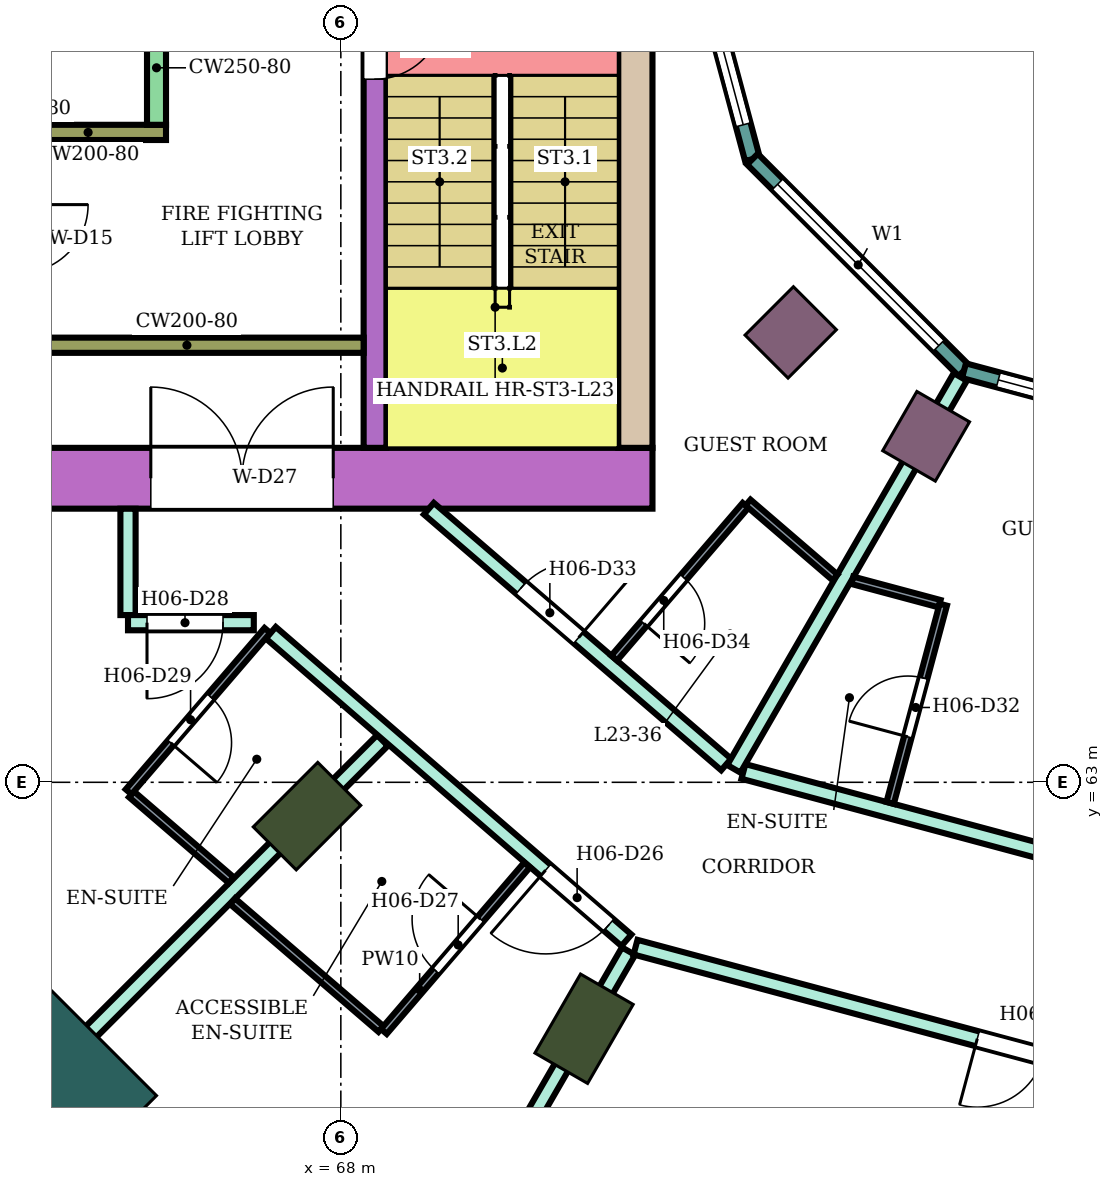
"""IFC4 building model, lengths in metres.
Left out: names, types, materials, properties, quantities, classifications, styles, units other than length and angle.
Written with IfcOpenShell. Run it as: python <this file> out.ifc"""

import sys

from ifc_helpers import new_model, si_unit, direction, frame, frame_2d, origin, origin_2d, place, context, subcontext, project, spatial, rectangle, extrude, element, fill, save


model = new_model("IFC4")
c1 = context("Model", 3, precision=1e-05, world=origin(), true_north=direction((0.0, 1.0)))
c2 = subcontext(c1, "Body", "Model", "MODEL_VIEW")
j1 = project(units=[si_unit("LENGTHUNIT", "METRE"), si_unit("PLANEANGLEUNIT", "RADIAN")], contexts=[c1])
p1 = place(None, origin())
s1 = spatial("IfcSite", under=j1, at=p1, CompositionType="ELEMENT")
p2 = place(p1, origin())
s2 = spatial("IfcBuilding", under=s1, at=p2, CompositionType="ELEMENT")
p3 = place(p2, frame((0.0, 0.0, 101.4)))
s3 = spatial("IfcBuildingStorey", under=s2, at=p3, CompositionType="ELEMENT", Elevation=101.4)
for number, where, z_axis, x_axis in (
    (1, (67.555, 62.555, 0.0), (0.0, 0.0, 1.0), (-0.707, -0.707, 0.0)),
    (2, (71.2, 59.758, 0.0), (0.0, 0.0, 1.0), (-0.5, -0.866, 0.0)),
):
    element("IfcColumn", number, at=place(p3, frame(where, z_axis=z_axis, x_axis=x_axis)), inside=s3, PredefinedType="COLUMN", context=c2, shape_type="SweptSolid", body=[
        extrude(rectangle(XDim=1.2, YDim=0.8, at=origin_2d()), origin(), (0.0, 0.0, 1.0), 3.8),
    ])
for number, where, z_axis, x_axis in (
    (3, (73.919, 68.919, 0.0), (0.0, 0.0, 1.0), (-0.707, -0.707, 0.0)),
    (4, (75.7, 67.552, 0.0), (0.0, 0.0, 1.0), (-0.5, -0.866, 0.0)),
):
    element("IfcColumn", number, at=place(p3, frame(where, z_axis=z_axis, x_axis=x_axis)), inside=s3, PredefinedType="COLUMN", context=c2, shape_type="SweptSolid", body=[
        extrude(rectangle(XDim=0.9, YDim=0.8, at=origin_2d()), origin(), (0.0, 0.0, 1.0), 3.8),
    ])
p4 = place(p3, frame((64.09, 59.09, 0.0), z_axis=(0.0, 0.0, 1.0), x_axis=(-0.707106781187, -0.707106781187, 0.0)))
e5 = element("IfcColumn", 5, at=p4, inside=s3, PredefinedType="COLUMN", context=c2, shape_type="SweptSolid", body=[
    extrude(rectangle(XDim=1.8, YDim=2.4, at=origin_2d()), origin(), (0.0, 0.0, 1.0), 3.8),
])
p5 = place(p3, frame((72.1, 67.0, 0.0), z_axis=(0.0, 0.0, 1.0), x_axis=(-1.0, 0.0, 0.0)))
e6 = element("IfcWall", 6, at=p5, inside=s3, PredefinedType="SHEAR", context=c2, shape_type="SweptSolid", body=[
    extrude(rectangle(XDim=14.7, YDim=0.8, at=frame_2d((7.35, 0.0))), origin(), (0.0, 0.0, 1.0), 3.48),
])
p6 = place(p5, frame((4.2, 0.0, 0.0)))
e7 = element("IfcOpeningElement", 7, at=p6, cuts=e6, PredefinedType="OPENING", context=c2, shape_type="SweptSolid", body=[
    extrude(rectangle(XDim=2.4, YDim=2.4, at=frame_2d((1.2, 1.2))), frame((0.0, 0.41, 0.0), z_axis=(0.0, -1.0, 0.0), x_axis=(1.0, 0.0, 0.0)), (0.0, 0.0, 1.0), 0.82),
])
p7 = place(p3, frame((71.875, 75.0, 0.0), z_axis=(0.0, 0.0, 1.0), x_axis=(0.0, -1.0, 0.0)))
e8 = element("IfcWall", 8, at=p7, inside=s3, PredefinedType="SHEAR", context=c2, shape_type="SweptSolid", body=[
    extrude(rectangle(XDim=7.6, YDim=0.45, at=frame_2d((3.8, 0.0))), origin(), (0.0, 0.0, 1.0), 3.48),
])
p8 = place(p3, frame((68.45, 75.0, 0.0), z_axis=(0.0, 0.0, 1.0), x_axis=(0.0, -1.0, 0.0)))
e9 = element("IfcWall", 9, at=p8, inside=s3, PredefinedType="SHEAR", context=c2, shape_type="SweptSolid", body=[
    extrude(rectangle(XDim=7.6, YDim=0.3, at=frame_2d((3.8, 0.0))), origin(), (0.0, 0.0, 1.0), 3.48),
])
p9 = place(p8, frame((1.85, 0.0, 0.0)))
e10 = element("IfcOpeningElement", 10, at=p9, cuts=e9, PredefinedType="OPENING", context=c2, shape_type="SweptSolid", body=[
    extrude(rectangle(XDim=0.9, YDim=2.1, at=frame_2d((0.45, 1.05))), frame((0.0, 0.16, 0.0), z_axis=(0.0, -1.0, 0.0), x_axis=(1.0, 0.0, 0.0)), (0.0, 0.0, 1.0), 0.32),
])
p10 = place(p3, frame((68.3, 68.75, 0.0), z_axis=(0.0, 0.0, 1.0), x_axis=(-1.0, 0.0, 0.0)))
e11 = element("IfcWall", 11, at=p10, inside=s3, PredefinedType="SHEAR", context=c2, shape_type="SweptSolid", body=[
    extrude(rectangle(XDim=4.65, YDim=0.2, at=frame_2d((2.325, 0.0))), origin(), (0.0, 0.0, 1.0), 3.48),
])
p11 = place(p3, frame((65.7, 71.55, 0.0), z_axis=(0.0, 0.0, 1.0), x_axis=(-1.0, 0.0, 0.0)))
e12 = element("IfcWall", 12, at=p11, inside=s3, PredefinedType="SHEAR", context=c2, shape_type="SweptSolid", body=[
    extrude(rectangle(XDim=2.05, YDim=0.2, at=frame_2d((1.025, 0.0))), origin(), (0.0, 0.0, 1.0), 3.48),
])
p12 = place(p3, frame((65.575, 73.15, 0.0), z_axis=(0.0, 0.0, 1.0), x_axis=(0.0, -1.0, 0.0)))
e13 = element("IfcWall", 13, at=p12, inside=s3, PredefinedType="SHEAR", context=c2, shape_type="SweptSolid", body=[
    extrude(rectangle(XDim=1.5, YDim=0.25, at=frame_2d((0.75, 0.0))), origin(), (0.0, 0.0, 1.0), 3.48),
])
p13 = place(p3, frame((72.396, 75.0, 0.0), z_axis=(0.0, 0.0, 1.0), x_axis=(0.258789828301, -0.965933654434, 0.0)))
e14 = element("IfcWall", 14, at=p13, inside=s3, PredefinedType="NOTDEFINED", context=c2, shape_type="SweptSolid", body=[
    extrude(rectangle(XDim=3.936, YDim=0.2, at=frame_2d((1.968, 0.0))), origin(), (0.0, 0.0, 1.0), 3.8),
])
p14 = place(p13, frame((0.468, 0.0, 0.9)))
e15 = element("IfcOpeningElement", 15, at=p14, cuts=e14, PredefinedType="OPENING", context=c2, shape_type="SweptSolid", body=[
    extrude(rectangle(XDim=3.0, YDim=2.3, at=frame_2d((1.5, 1.15))), frame((0.0, 0.11, 0.0), z_axis=(0.0, -1.0, 0.0), x_axis=(1.0, 0.0, 0.0)), (0.0, 0.0, 1.0), 0.22),
])
p15 = place(p3, frame((73.415, 71.198, 0.0), z_axis=(0.0, 0.0, 1.0), x_axis=(0.707106781187, -0.707106781187, 0.0)))
e16 = element("IfcWall", 16, at=p15, inside=s3, PredefinedType="NOTDEFINED", context=c2, shape_type="SweptSolid", body=[
    extrude(rectangle(XDim=3.936, YDim=0.2, at=frame_2d((1.968, 0.0))), origin(), (0.0, 0.0, 1.0), 3.8),
])
p16 = place(p15, frame((0.468, 0.0, 0.9)))
e17 = element("IfcOpeningElement", 17, at=p16, cuts=e16, PredefinedType="OPENING", context=c2, shape_type="SweptSolid", body=[
    extrude(rectangle(XDim=3.0, YDim=2.3, at=frame_2d((1.5, 1.15))), frame((0.0, 0.11, 0.0), z_axis=(0.0, -1.0, 0.0), x_axis=(1.0, 0.0, 0.0)), (0.0, 0.0, 1.0), 0.22),
])
p17 = place(p3, frame((76.198, 68.415, 0.0), z_axis=(0.0, 0.0, 1.0), x_axis=(0.965933654434, -0.258789828301, 0.0)))
e18 = element("IfcWall", 18, at=p17, inside=s3, PredefinedType="NOTDEFINED", context=c2, shape_type="SweptSolid", body=[
    extrude(rectangle(XDim=3.936, YDim=0.2, at=frame_2d((1.968, 0.0))), origin(), (0.0, 0.0, 1.0), 3.8),
])
p18 = place(p17, frame((0.468, 0.0, 0.9)))
e19 = element("IfcOpeningElement", 19, at=p18, cuts=e18, PredefinedType="OPENING", context=c2, shape_type="SweptSolid", body=[
    extrude(rectangle(XDim=3.0, YDim=2.3, at=frame_2d((1.5, 1.15))), frame((0.0, 0.11, 0.0), z_axis=(0.0, -1.0, 0.0), x_axis=(1.0, 0.0, 0.0)), (0.0, 0.0, 1.0), 0.22),
])
p19 = place(p3, frame((63.594, 58.598, 0.0), z_axis=(0.0, 0.0, 1.0), x_axis=(0.707228748718, 0.706984792613, 0.0)))
e20 = element("IfcWall", 20, at=p19, inside=s3, PredefinedType="PARTITIONING", context=c2, shape_type="SweptSolid", body=[
    extrude(rectangle(XDim=7.005, YDim=0.2, at=frame_2d((3.503, 0.0))), origin(), (0.0, 0.0, 1.0), 3.35),
])
p20 = place(p3, frame((65.2, 65.2, 0.0), z_axis=(0.0, 0.0, 1.0), x_axis=(0.0, 1.0, 0.0)))
e21 = element("IfcWall", 21, at=p20, inside=s3, PredefinedType="PARTITIONING", context=c2, shape_type="SweptSolid", body=[
    extrude(rectangle(XDim=1.399, YDim=0.2, at=frame_2d((0.7, 0.0))), origin(), (0.0, 0.0, 1.0), 3.35),
])
p21 = place(p3, frame((65.2, 65.1, 0.0), z_axis=(0.0, 0.0, 1.0), x_axis=(1.0, 0.0, 0.0)))
e22 = element("IfcWall", 22, at=p21, inside=s3, PredefinedType="PARTITIONING", context=c2, shape_type="SweptSolid", body=[
    extrude(rectangle(XDim=1.655, YDim=0.2, at=frame_2d((0.828, 0.0))), origin(), (0.0, 0.0, 1.0), 3.35),
])
p22 = place(p21, frame((0.25, 0.0, 0.0)))
e23 = element("IfcOpeningElement", 23, at=p22, cuts=e22, PredefinedType="OPENING", context=c2, shape_type="SweptSolid", body=[
    extrude(rectangle(XDim=1.0, YDim=2.1, at=frame_2d((0.5, 1.05))), frame((0.0, 0.11, 0.0), z_axis=(0.0, -1.0, 0.0), x_axis=(1.0, 0.0, 0.0)), (0.0, 0.0, 1.0), 0.22),
])
p23 = place(p3, frame((67.079, 64.968, 0.0), z_axis=(0.0, 0.0, 1.0), x_axis=(0.756371089567, -0.654142778656, 0.0)))
e24 = element("IfcWall", 24, at=p23, inside=s3, PredefinedType="PARTITIONING", context=c2, shape_type="SweptSolid", body=[
    extrude(rectangle(XDim=6.185, YDim=0.2, at=frame_2d((3.093, 0.0))), origin(), (0.0, 0.0, 1.0), 3.35),
])
p24 = place(p23, frame((4.778, 0.0, 0.0)))
e25 = element("IfcOpeningElement", 25, at=p24, cuts=e24, PredefinedType="OPENING", context=c2, shape_type="SweptSolid", body=[
    extrude(rectangle(XDim=1.1, YDim=2.1, at=frame_2d((0.55, 1.05))), frame((0.0, 0.11, 0.0), z_axis=(0.0, -1.0, 0.0), x_axis=(1.0, 0.0, 0.0)), (0.0, 0.0, 1.0), 0.22),
])
p25 = place(p3, frame((67.096, 52.662, 0.0), z_axis=(0.0, 0.0, 1.0), x_axis=(0.500222922337, 0.865896661253, 0.0)))
e26 = element("IfcWall", 26, at=p25, inside=s3, PredefinedType="PARTITIONING", context=c2, shape_type="SweptSolid", body=[
    extrude(rectangle(XDim=9.374, YDim=0.2, at=frame_2d((4.687, 0.0))), origin(), (0.0, 0.0, 1.0), 3.35),
])
p26 = place(p3, frame((69.158, 66.6, 0.0), z_axis=(0.0, 0.0, 1.0), x_axis=(0.757976058094, -0.652282373943, 0.0)))
e27 = element("IfcWall", 27, at=p26, inside=s3, PredefinedType="PARTITIONING", context=c2, shape_type="SweptSolid", body=[
    extrude(rectangle(XDim=5.16, YDim=0.2, at=frame_2d((2.58, 0.0))), origin(), (0.0, 0.0, 1.0), 3.35),
])
p27 = place(p26, frame((1.6, 0.0, 0.0)))
e28 = element("IfcOpeningElement", 28, at=p27, cuts=e27, PredefinedType="OPENING", context=c2, shape_type="SweptSolid", body=[
    extrude(rectangle(XDim=1.0, YDim=2.1, at=frame_2d((0.5, 1.05))), frame((0.0, 0.11, 0.0), z_axis=(0.0, -1.0, 0.0), x_axis=(1.0, 0.0, 0.0)), (0.0, 0.0, 1.0), 0.22),
])
p28 = place(p3, frame((71.877, 60.831, 0.0), z_axis=(0.0, 0.0, 1.0), x_axis=(0.965905026676, -0.258896657842, 0.0)))
e29 = element("IfcWall", 29, at=p28, inside=s3, PredefinedType="PARTITIONING", context=c2, shape_type="SweptSolid", body=[
    extrude(rectangle(XDim=8.36, YDim=0.2, at=frame_2d((4.18, 0.0))), origin(), (0.0, 0.0, 1.0), 3.35),
])
p29 = place(p28, frame((4.655, 0.0, 0.0)))
e30 = element("IfcOpeningElement", 30, at=p29, cuts=e29, PredefinedType="OPENING", context=c2, shape_type="SweptSolid", body=[
    extrude(rectangle(XDim=1.8, YDim=2.1, at=frame_2d((0.9, 1.05))), frame((0.0, 0.11, 0.0), z_axis=(0.0, -1.0, 0.0), x_axis=(1.0, 0.0, 0.0)), (0.0, 0.0, 1.0), 0.22),
])
p30 = place(p3, frame((73.297, 63.143, 0.0), z_axis=(0.0, 0.0, 1.0), x_axis=(0.965859030528, -0.25906820173, 0.0)))
e31 = element("IfcWall", 31, at=p30, inside=s3, PredefinedType="PARTITIONING", context=c2, shape_type="SweptSolid", body=[
    extrude(rectangle(XDim=6.81, YDim=0.2, at=frame_2d((3.405, 0.0))), origin(), (0.0, 0.0, 1.0), 3.35),
])
p31 = place(p30, frame((5.39, 0.0, 0.0)))
e32 = element("IfcOpeningElement", 32, at=p31, cuts=e31, PredefinedType="OPENING", context=c2, shape_type="SweptSolid", body=[
    extrude(rectangle(XDim=1.0, YDim=2.1, at=frame_2d((0.5, 1.05))), frame((0.0, 0.11, 0.0), z_axis=(0.0, -1.0, 0.0), x_axis=(1.0, 0.0, 0.0)), (0.0, 0.0, 1.0), 0.22),
])
p32 = place(p3, frame((73.171, 63.177, 0.0), z_axis=(0.0, 0.0, 1.0), x_axis=(0.500257106344, 0.865876912472, 0.0)))
e33 = element("IfcWall", 33, at=p32, inside=s3, PredefinedType="PARTITIONING", context=c2, shape_type="SweptSolid", body=[
    extrude(rectangle(XDim=5.955, YDim=0.2, at=frame_2d((2.978, 0.0))), origin(), (0.0, 0.0, 1.0), 3.35),
])
p33 = place(p3, frame((65.246, 62.842, 0.0), z_axis=(0.0, 0.0, 1.0), x_axis=(0.758030338995, -0.652219292234, 0.0)))
e34 = element("IfcWall", 34, at=p33, inside=s3, PredefinedType="PARTITIONING", context=c2, shape_type="SweptSolid", body=[
    extrude(rectangle(XDim=1.73, YDim=0.1, at=frame_2d((0.865, 0.0))), origin(), (0.0, 0.0, 1.0), 3.35),
])
p34 = place(p3, frame((65.208, 62.875, 0.0), z_axis=(0.0, 0.0, 1.0), x_axis=(0.65205430601, 0.758172264076, 0.0)))
e35 = element("IfcWall", 35, at=p34, inside=s3, PredefinedType="PARTITIONING", context=c2, shape_type="SweptSolid", body=[
    extrude(rectangle(XDim=2.8, YDim=0.1, at=frame_2d((1.4, 0.0))), origin(), (0.0, 0.0, 1.0), 3.35),
])
p35 = place(p34, frame((0.85, 0.0, 0.0)))
e36 = element("IfcOpeningElement", 36, at=p35, cuts=e35, PredefinedType="OPENING", context=c2, shape_type="SweptSolid", body=[
    extrude(rectangle(XDim=0.8, YDim=2.1, at=frame_2d((0.4, 1.05))), frame((0.0, 0.06, 0.0), z_axis=(0.0, -1.0, 0.0), x_axis=(1.0, 0.0, 0.0)), (0.0, 0.0, 1.0), 0.12),
])
p36 = place(p3, frame((66.576, 61.435, 0.0), z_axis=(0.0, 0.0, 1.0), x_axis=(0.757970550281, -0.652288774169, 0.0)))
e37 = element("IfcWall", 37, at=p36, inside=s3, PredefinedType="PARTITIONING", context=c2, shape_type="SweptSolid", body=[
    extrude(rectangle(XDim=2.576, YDim=0.1, at=frame_2d((1.288, 0.0))), origin(), (0.0, 0.0, 1.0), 3.35),
])
p37 = place(p3, frame((68.566, 59.722, 0.0), z_axis=(0.0, 0.0, 1.0), x_axis=(0.65193146671, 0.758277892803, 0.0)))
e38 = element("IfcWall", 38, at=p37, inside=s3, PredefinedType="PARTITIONING", context=c2, shape_type="SweptSolid", body=[
    extrude(rectangle(XDim=2.89, YDim=0.1, at=frame_2d((1.445, 0.0))), origin(), (0.0, 0.0, 1.0), 3.35),
])
p38 = place(p37, frame((1.05, 0.0, 0.0)))
e39 = element("IfcOpeningElement", 39, at=p38, cuts=e38, PredefinedType="OPENING", context=c2, shape_type="SweptSolid", body=[
    extrude(rectangle(XDim=0.9, YDim=2.1, at=frame_2d((0.45, 1.05))), frame((0.0, 0.06, 0.0), z_axis=(0.0, -1.0, 0.0), x_axis=(1.0, 0.0, 0.0)), (0.0, 0.0, 1.0), 0.12),
])
p39 = place(p3, frame((71.596, 64.635, 0.0), z_axis=(0.0, 0.0, 1.0), x_axis=(0.652285007511, 0.757973791748, 0.0)))
e40 = element("IfcWall", 40, at=p39, inside=s3, PredefinedType="PARTITIONING", context=c2, shape_type="SweptSolid", body=[
    extrude(rectangle(XDim=2.65, YDim=0.1, at=frame_2d((1.325, 0.0))), origin(), (0.0, 0.0, 1.0), 3.35),
])
p40 = place(p39, frame((0.6, 0.0, 0.0)))
e41 = element("IfcOpeningElement", 41, at=p40, cuts=e40, PredefinedType="OPENING", context=c2, shape_type="SweptSolid", body=[
    extrude(rectangle(XDim=0.8, YDim=2.1, at=frame_2d((0.4, 1.05))), frame((0.0, 0.06, 0.0), z_axis=(0.0, -1.0, 0.0), x_axis=(1.0, 0.0, 0.0)), (0.0, 0.0, 1.0), 0.12),
])
p41 = place(p3, frame((73.357, 66.681, 0.0), z_axis=(0.0, 0.0, 1.0), x_axis=(0.758263469747, -0.651948242154, 0.0)))
e42 = element("IfcWall", 42, at=p41, inside=s3, PredefinedType="PARTITIONING", context=c2, shape_type="SweptSolid", body=[
    extrude(rectangle(XDim=1.511, YDim=0.1, at=frame_2d((0.755, 0.0))), origin(), (0.0, 0.0, 1.0), 3.35),
])
p42 = place(p3, frame((74.729, 65.657, 0.0), z_axis=(0.0, 0.0, 1.0), x_axis=(0.965948051503, -0.258736085224, 0.0)))
e43 = element("IfcWall", 43, at=p42, inside=s3, PredefinedType="PARTITIONING", context=c2, shape_type="SweptSolid", body=[
    extrude(rectangle(XDim=1.189, YDim=0.1, at=frame_2d((0.594, 0.0))), origin(), (0.0, 0.0, 1.0), 3.35),
])
p43 = place(p3, frame((75.227, 62.729, 0.0), z_axis=(0.0, 0.0, 1.0), x_axis=(0.258945475746, 0.965891940432, 0.0)))
e44 = element("IfcWall", 44, at=p43, inside=s3, PredefinedType="PARTITIONING", context=c2, shape_type="SweptSolid", body=[
    extrude(rectangle(XDim=2.7, YDim=0.1, at=frame_2d((1.35, 0.0))), origin(), (0.0, 0.0, 1.0), 3.35),
])
p44 = place(p43, frame((0.9, 0.0, 0.0)))
e45 = element("IfcOpeningElement", 45, at=p44, cuts=e44, PredefinedType="OPENING", context=c2, shape_type="SweptSolid", body=[
    extrude(rectangle(XDim=0.8, YDim=2.1, at=frame_2d((0.4, 1.05))), frame((0.0, 0.06, 0.0), z_axis=(0.0, -1.0, 0.0), x_axis=(1.0, 0.0, 0.0)), (0.0, 0.0, 1.0), 0.12),
])
p45 = place(p14, origin())
e46 = element("IfcWindow", 46, at=p45, inside=s3, PartitioningType="SINGLE_PANEL", PredefinedType="WINDOW", context=c2, shape_type="SweptSolid", body=[
    extrude(rectangle(XDim=3.0, YDim=2.3, at=frame_2d((1.5, 1.15))), frame((0.0, 0.03, 0.0), z_axis=(0.0, -1.0, 0.0), x_axis=(1.0, 0.0, 0.0)), (0.0, 0.0, 1.0), 0.06),
])
fill(e15, e46)
p46 = place(p16, origin())
e47 = element("IfcWindow", 47, at=p46, inside=s3, PartitioningType="SINGLE_PANEL", PredefinedType="WINDOW", context=c2, shape_type="SweptSolid", body=[
    extrude(rectangle(XDim=3.0, YDim=2.3, at=frame_2d((1.5, 1.15))), frame((0.0, 0.03, 0.0), z_axis=(0.0, -1.0, 0.0), x_axis=(1.0, 0.0, 0.0)), (0.0, 0.0, 1.0), 0.06),
])
fill(e17, e47)
p47 = place(p18, origin())
e48 = element("IfcWindow", 48, at=p47, inside=s3, PartitioningType="SINGLE_PANEL", PredefinedType="WINDOW", context=c2, shape_type="SweptSolid", body=[
    extrude(rectangle(XDim=3.0, YDim=2.3, at=frame_2d((1.5, 1.15))), frame((0.0, 0.03, 0.0), z_axis=(0.0, -1.0, 0.0), x_axis=(1.0, 0.0, 0.0)), (0.0, 0.0, 1.0), 0.06),
])
fill(e19, e48)
p48 = place(p29, frame((1.8, 0.0, 0.0), z_axis=(0.0, 0.0, 1.0), x_axis=(-1.0, 0.0, 0.0)))
e49 = element("IfcDoor", 49, at=p48, inside=s3, OperationType="DOUBLE_DOOR_SINGLE_SWING", PredefinedType="DOOR", context=c2, shape_type="SweptSolid", body=[
    extrude(rectangle(XDim=1.8, YDim=2.1, at=frame_2d((0.9, 1.05))), frame((0.0, 0.025, 0.0), z_axis=(0.0, -1.0, 0.0), x_axis=(1.0, 0.0, 0.0)), (0.0, 0.0, 1.0), 0.05),
])
fill(e30, e49)
p49 = place(p24, frame((1.1, 0.0, 0.0), z_axis=(0.0, 0.0, 1.0), x_axis=(-1.0, 0.0, 0.0)))
e50 = element("IfcDoor", 50, at=p49, inside=s3, OperationType="SINGLE_SWING_RIGHT", PredefinedType="DOOR", context=c2, shape_type="SweptSolid", body=[
    extrude(rectangle(XDim=1.1, YDim=2.1, at=frame_2d((0.55, 1.05))), frame((0.0, 0.025, 0.0), z_axis=(0.0, -1.0, 0.0), x_axis=(1.0, 0.0, 0.0)), (0.0, 0.0, 1.0), 0.05),
])
fill(e25, e50)
p50 = place(p38, origin())
e51 = element("IfcDoor", 51, at=p50, inside=s3, OperationType="SINGLE_SWING_RIGHT", PredefinedType="DOOR", context=c2, shape_type="SweptSolid", body=[
    extrude(rectangle(XDim=0.9, YDim=2.1, at=frame_2d((0.45, 1.05))), frame((0.0, 0.025, 0.0), z_axis=(0.0, -1.0, 0.0), x_axis=(1.0, 0.0, 0.0)), (0.0, 0.0, 1.0), 0.05),
])
fill(e39, e51)
p51 = place(p22, frame((1.0, 0.0, 0.0), z_axis=(0.0, 0.0, 1.0), x_axis=(-1.0, 0.0, 0.0)))
e52 = element("IfcDoor", 52, at=p51, inside=s3, OperationType="SINGLE_SWING_RIGHT", PredefinedType="DOOR", context=c2, shape_type="SweptSolid", body=[
    extrude(rectangle(XDim=1.0, YDim=2.1, at=frame_2d((0.5, 1.05))), frame((0.0, 0.025, 0.0), z_axis=(0.0, -1.0, 0.0), x_axis=(1.0, 0.0, 0.0)), (0.0, 0.0, 1.0), 0.05),
])
fill(e23, e52)
p52 = place(p35, frame((0.8, 0.0, 0.0), z_axis=(0.0, 0.0, 1.0), x_axis=(-1.0, 0.0, 0.0)))
e53 = element("IfcDoor", 53, at=p52, inside=s3, OperationType="SINGLE_SWING_RIGHT", PredefinedType="DOOR", context=c2, shape_type="SweptSolid", body=[
    extrude(rectangle(XDim=0.8, YDim=2.1, at=frame_2d((0.4, 1.05))), frame((0.0, 0.025, 0.0), z_axis=(0.0, -1.0, 0.0), x_axis=(1.0, 0.0, 0.0)), (0.0, 0.0, 1.0), 0.05),
])
fill(e36, e53)
p53 = place(p44, origin())
e54 = element("IfcDoor", 54, at=p53, inside=s3, OperationType="SINGLE_SWING_LEFT", PredefinedType="DOOR", context=c2, shape_type="SweptSolid", body=[
    extrude(rectangle(XDim=0.8, YDim=2.1, at=frame_2d((0.4, 1.05))), frame((0.0, 0.025, 0.0), z_axis=(0.0, -1.0, 0.0), x_axis=(1.0, 0.0, 0.0)), (0.0, 0.0, 1.0), 0.05),
])
fill(e45, e54)
p54 = place(p27, origin())
e55 = element("IfcDoor", 55, at=p54, inside=s3, OperationType="SINGLE_SWING_RIGHT", PredefinedType="DOOR", context=c2, shape_type="SweptSolid", body=[
    extrude(rectangle(XDim=1.0, YDim=2.1, at=frame_2d((0.5, 1.05))), frame((0.0, 0.025, 0.0), z_axis=(0.0, -1.0, 0.0), x_axis=(1.0, 0.0, 0.0)), (0.0, 0.0, 1.0), 0.05),
])
fill(e28, e55)
p55 = place(p40, frame((0.8, 0.0, 0.0), z_axis=(0.0, 0.0, 1.0), x_axis=(-1.0, 0.0, 0.0)))
e56 = element("IfcDoor", 56, at=p55, inside=s3, OperationType="SINGLE_SWING_RIGHT", PredefinedType="DOOR", context=c2, shape_type="SweptSolid", body=[
    extrude(rectangle(XDim=0.8, YDim=2.1, at=frame_2d((0.4, 1.05))), frame((0.0, 0.025, 0.0), z_axis=(0.0, -1.0, 0.0), x_axis=(1.0, 0.0, 0.0)), (0.0, 0.0, 1.0), 0.05),
])
fill(e41, e56)
p56 = place(p9, origin())
e57 = element("IfcDoor", 57, at=p56, inside=s3, OperationType="SINGLE_SWING_LEFT", PredefinedType="DOOR", context=c2, shape_type="SweptSolid", body=[
    extrude(rectangle(XDim=0.9, YDim=2.1, at=frame_2d((0.45, 1.05))), frame((0.0, 0.025, 0.0), z_axis=(0.0, -1.0, 0.0), x_axis=(1.0, 0.0, 0.0)), (0.0, 0.0, 1.0), 0.05),
])
fill(e10, e57)
p57 = place(p6, frame((2.4, 0.0, 0.0), z_axis=(0.0, 0.0, 1.0), x_axis=(-1.0, 0.0, 0.0)))
e58 = element("IfcDoor", 58, at=p57, inside=s3, OperationType="DOUBLE_DOOR_SINGLE_SWING", PredefinedType="DOOR", context=c2, shape_type="SweptSolid", body=[
    extrude(rectangle(XDim=2.4, YDim=2.4, at=frame_2d((1.2, 1.2))), frame((0.0, 0.025, 0.0), z_axis=(0.0, -1.0, 0.0), x_axis=(1.0, 0.0, 0.0)), (0.0, 0.0, 1.0), 0.05),
])
fill(e7, e58)
save(model, sys.argv[1])
